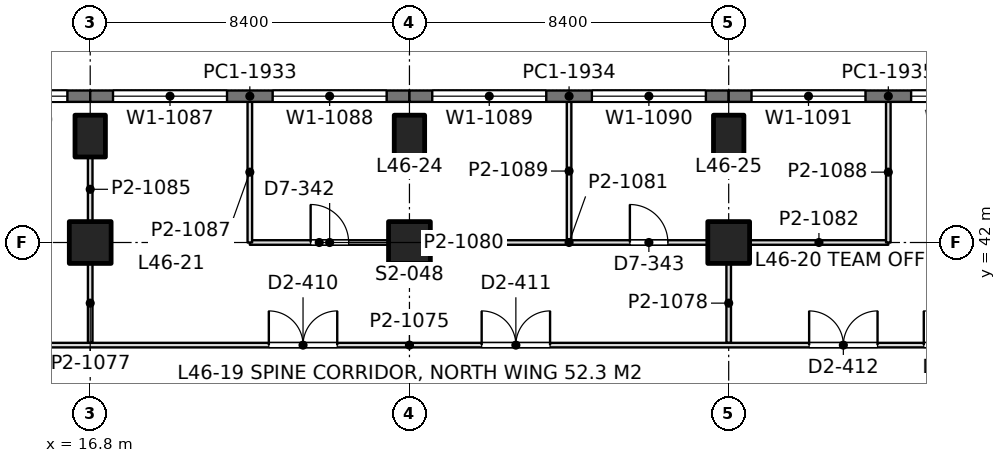
"""IFC4 building model, lengths in metres.
Left out: names, types, materials, properties, quantities, classifications, styles, units other than length and angle.
Written with IfcOpenShell. Run it as: python <this file> out.ifc"""

import sys

from ifc_helpers import new_model, si_unit, direction, frame, frame_2d, origin, origin_2d, place, context, subcontext, project, spatial, rectangle, extrude, element, fill, save


model = new_model("IFC4")
c1 = context("Model", 3, precision=1e-05, world=origin(), true_north=direction((0.0, 1.0)))
c2 = subcontext(c1, "Body", "Model", "MODEL_VIEW")
j1 = project(units=[si_unit("LENGTHUNIT", "METRE"), si_unit("PLANEANGLEUNIT", "RADIAN")], contexts=[c1])
p1 = place(None, origin())
s1 = spatial("IfcSite", under=j1, at=p1, CompositionType="ELEMENT")
p2 = place(p1, origin())
s2 = spatial("IfcBuilding", under=s1, at=p2, CompositionType="ELEMENT")
p3 = place(p2, frame((0.0, 0.0, 202.8)))
s3 = spatial("IfcBuildingStorey", under=s2, at=p3, CompositionType="ELEMENT", Elevation=202.8)
p4 = place(p3, frame((16.8, 42.0, 0.0), z_axis=(0.0, 0.0, 1.0), x_axis=(1.0, 0.0, 0.0)))
e1 = element("IfcColumn", 1, at=p4, inside=s3, PredefinedType="COLUMN", context=c2, shape_type="SweptSolid", body=[
    extrude(rectangle(XDim=1.1, YDim=1.1, at=origin_2d()), origin(), (0.0, 0.0, 1.0), 4.2),
])
p5 = place(p3, frame((16.8, 44.8, 0.0), z_axis=(0.0, 0.0, 1.0), x_axis=(1.0, 0.0, 0.0)))
e2 = element("IfcColumn", 2, at=p5, inside=s3, PredefinedType="COLUMN", context=c2, shape_type="SweptSolid", body=[
    extrude(rectangle(XDim=0.8, YDim=1.1, at=origin_2d()), origin(), (0.0, 0.0, 1.0), 4.2),
])
p6 = place(p3, frame((25.2, 42.0, 0.0), z_axis=(0.0, 0.0, 1.0), x_axis=(1.0, 0.0, 0.0)))
e3 = element("IfcColumn", 3, at=p6, inside=s3, PredefinedType="COLUMN", context=c2, shape_type="SweptSolid", body=[
    extrude(rectangle(XDim=1.1, YDim=1.1, at=origin_2d()), origin(), (0.0, 0.0, 1.0), 4.2),
])
p7 = place(p3, frame((25.2, 44.8, 0.0), z_axis=(0.0, 0.0, 1.0), x_axis=(1.0, 0.0, 0.0)))
e4 = element("IfcColumn", 4, at=p7, inside=s3, PredefinedType="COLUMN", context=c2, shape_type="SweptSolid", body=[
    extrude(rectangle(XDim=0.8, YDim=1.1, at=origin_2d()), origin(), (0.0, 0.0, 1.0), 4.2),
])
p8 = place(p3, frame((33.6, 42.0, 0.0), z_axis=(0.0, 0.0, 1.0), x_axis=(1.0, 0.0, 0.0)))
e5 = element("IfcColumn", 5, at=p8, inside=s3, PredefinedType="COLUMN", context=c2, shape_type="SweptSolid", body=[
    extrude(rectangle(XDim=1.1, YDim=1.1, at=origin_2d()), origin(), (0.0, 0.0, 1.0), 4.2),
])
p9 = place(p3, frame((33.6, 44.8, 0.0), z_axis=(0.0, 0.0, 1.0), x_axis=(1.0, 0.0, 0.0)))
e6 = element("IfcColumn", 6, at=p9, inside=s3, PredefinedType="COLUMN", context=c2, shape_type="SweptSolid", body=[
    extrude(rectangle(XDim=0.8, YDim=1.1, at=origin_2d()), origin(), (0.0, 0.0, 1.0), 4.2),
])
p10 = place(p3, frame((8.4, 45.85, 0.0), z_axis=(0.0, 0.0, 1.0), x_axis=(1.0, 0.0, 0.0)))
e7 = element("IfcWall", 7, at=p10, inside=s3, PredefinedType="SOLIDWALL", context=c2, shape_type="SweptSolid", body=[
    extrude(rectangle(XDim=8.4, YDim=0.3, at=frame_2d((4.2, 0.0))), origin(), (0.0, 0.0, 1.0), 4.05),
])
p11 = place(p10, frame((0.6, 0.0, 0.9)))
e8 = element("IfcOpeningElement", 8, at=p11, cuts=e7, PredefinedType="OPENING", context=c2, shape_type="SweptSolid", body=[
    extrude(rectangle(XDim=3.0, YDim=1.9, at=frame_2d((1.5, 0.95))), frame((0.0, 0.16, 0.0), z_axis=(0.0, -1.0, 0.0), x_axis=(1.0, 0.0, 0.0)), (0.0, 0.0, 1.0), 0.32),
])
p12 = place(p10, frame((4.8, 0.0, 0.9)))
e9 = element("IfcOpeningElement", 9, at=p12, cuts=e7, PredefinedType="OPENING", context=c2, shape_type="SweptSolid", body=[
    extrude(rectangle(XDim=3.0, YDim=1.9, at=frame_2d((1.5, 0.95))), frame((0.0, 0.16, 0.0), z_axis=(0.0, -1.0, 0.0), x_axis=(1.0, 0.0, 0.0)), (0.0, 0.0, 1.0), 0.32),
])
p13 = place(p3, frame((16.8, 45.85, 0.0), z_axis=(0.0, 0.0, 1.0), x_axis=(1.0, 0.0, 0.0)))
e10 = element("IfcWall", 10, at=p13, inside=s3, PredefinedType="SOLIDWALL", context=c2, shape_type="SweptSolid", body=[
    extrude(rectangle(XDim=8.4, YDim=0.3, at=frame_2d((4.2, 0.0))), origin(), (0.0, 0.0, 1.0), 4.05),
])
p14 = place(p13, frame((0.6, 0.0, 0.9)))
e11 = element("IfcOpeningElement", 11, at=p14, cuts=e10, PredefinedType="OPENING", context=c2, shape_type="SweptSolid", body=[
    extrude(rectangle(XDim=3.0, YDim=1.9, at=frame_2d((1.5, 0.95))), frame((0.0, 0.16, 0.0), z_axis=(0.0, -1.0, 0.0), x_axis=(1.0, 0.0, 0.0)), (0.0, 0.0, 1.0), 0.32),
])
p15 = place(p13, frame((4.8, 0.0, 0.9)))
e12 = element("IfcOpeningElement", 12, at=p15, cuts=e10, PredefinedType="OPENING", context=c2, shape_type="SweptSolid", body=[
    extrude(rectangle(XDim=3.0, YDim=1.9, at=frame_2d((1.5, 0.95))), frame((0.0, 0.16, 0.0), z_axis=(0.0, -1.0, 0.0), x_axis=(1.0, 0.0, 0.0)), (0.0, 0.0, 1.0), 0.32),
])
p16 = place(p3, frame((25.2, 45.85, 0.0), z_axis=(0.0, 0.0, 1.0), x_axis=(1.0, 0.0, 0.0)))
e13 = element("IfcWall", 13, at=p16, inside=s3, PredefinedType="SOLIDWALL", context=c2, shape_type="SweptSolid", body=[
    extrude(rectangle(XDim=8.4, YDim=0.3, at=frame_2d((4.2, 0.0))), origin(), (0.0, 0.0, 1.0), 4.05),
])
p17 = place(p16, frame((0.6, 0.0, 0.9)))
e14 = element("IfcOpeningElement", 14, at=p17, cuts=e13, PredefinedType="OPENING", context=c2, shape_type="SweptSolid", body=[
    extrude(rectangle(XDim=3.0, YDim=1.9, at=frame_2d((1.5, 0.95))), frame((0.0, 0.16, 0.0), z_axis=(0.0, -1.0, 0.0), x_axis=(1.0, 0.0, 0.0)), (0.0, 0.0, 1.0), 0.32),
])
p18 = place(p16, frame((4.8, 0.0, 0.9)))
e15 = element("IfcOpeningElement", 15, at=p18, cuts=e13, PredefinedType="OPENING", context=c2, shape_type="SweptSolid", body=[
    extrude(rectangle(XDim=3.0, YDim=1.9, at=frame_2d((1.5, 0.95))), frame((0.0, 0.16, 0.0), z_axis=(0.0, -1.0, 0.0), x_axis=(1.0, 0.0, 0.0)), (0.0, 0.0, 1.0), 0.32),
])
p19 = place(p3, frame((33.6, 45.85, 0.0), z_axis=(0.0, 0.0, 1.0), x_axis=(1.0, 0.0, 0.0)))
e16 = element("IfcWall", 16, at=p19, inside=s3, PredefinedType="SOLIDWALL", context=c2, shape_type="SweptSolid", body=[
    extrude(rectangle(XDim=8.4, YDim=0.3, at=frame_2d((4.2, 0.0))), origin(), (0.0, 0.0, 1.0), 4.05),
])
p20 = place(p19, frame((0.6, 0.0, 0.9)))
e17 = element("IfcOpeningElement", 17, at=p20, cuts=e16, PredefinedType="OPENING", context=c2, shape_type="SweptSolid", body=[
    extrude(rectangle(XDim=3.0, YDim=1.9, at=frame_2d((1.5, 0.95))), frame((0.0, 0.16, 0.0), z_axis=(0.0, -1.0, 0.0), x_axis=(1.0, 0.0, 0.0)), (0.0, 0.0, 1.0), 0.32),
])
p21 = place(p19, frame((4.8, 0.0, 0.9)))
e18 = element("IfcOpeningElement", 18, at=p21, cuts=e16, PredefinedType="OPENING", context=c2, shape_type="SweptSolid", body=[
    extrude(rectangle(XDim=3.0, YDim=1.9, at=frame_2d((1.5, 0.95))), frame((0.0, 0.16, 0.0), z_axis=(0.0, -1.0, 0.0), x_axis=(1.0, 0.0, 0.0)), (0.0, 0.0, 1.0), 0.32),
])
p22 = place(p3, frame((21.0, 42.0, 0.0), z_axis=(0.0, 0.0, 1.0), x_axis=(1.0, 0.0, 0.0)))
e19 = element("IfcWall", 19, at=p22, inside=s3, PredefinedType="PARTITIONING", context=c2, shape_type="SweptSolid", body=[
    extrude(rectangle(XDim=3.651, YDim=0.12, at=frame_2d((1.825, 0.0))), origin(), (0.0, 0.0, 1.0), 3.55),
])
p23 = place(p22, frame((1.6, 0.0, 0.0)))
e20 = element("IfcOpeningElement", 20, at=p23, cuts=e19, PredefinedType="OPENING", context=c2, shape_type="SweptSolid", body=[
    extrude(rectangle(XDim=1.0, YDim=2.4, at=frame_2d((0.5, 1.2))), frame((0.0, 0.07, 0.0), z_axis=(0.0, -1.0, 0.0), x_axis=(1.0, 0.0, 0.0)), (0.0, 0.0, 1.0), 0.14),
])
p24 = place(p3, frame((25.749, 42.0, 0.0), z_axis=(0.0, 0.0, 1.0), x_axis=(1.0, 0.0, 0.0)))
e21 = element("IfcWall", 21, at=p24, inside=s3, PredefinedType="PARTITIONING", context=c2, shape_type="SweptSolid", body=[
    extrude(rectangle(XDim=7.302, YDim=0.12, at=frame_2d((3.651, 0.0))), origin(), (0.0, 0.0, 1.0), 3.55),
])
p25 = place(p24, frame((5.251, 0.0, 0.0)))
e22 = element("IfcOpeningElement", 22, at=p25, cuts=e21, PredefinedType="OPENING", context=c2, shape_type="SweptSolid", body=[
    extrude(rectangle(XDim=1.0, YDim=2.4, at=frame_2d((0.5, 1.2))), frame((0.0, 0.07, 0.0), z_axis=(0.0, -1.0, 0.0), x_axis=(1.0, 0.0, 0.0)), (0.0, 0.0, 1.0), 0.14),
])
p26 = place(p3, frame((34.149, 42.0, 0.0), z_axis=(0.0, 0.0, 1.0), x_axis=(1.0, 0.0, 0.0)))
e23 = element("IfcWall", 23, at=p26, inside=s3, PredefinedType="PARTITIONING", context=c2, shape_type="SweptSolid", body=[
    extrude(rectangle(XDim=3.651, YDim=0.12, at=frame_2d((1.826, 0.0))), origin(), (0.0, 0.0, 1.0), 3.55),
])
p27 = place(p3, frame((21.0, 42.0, 0.0), z_axis=(0.0, 0.0, 1.0), x_axis=(0.0, 1.0, 0.0)))
e24 = element("IfcWall", 24, at=p27, inside=s3, PredefinedType="PARTITIONING", context=c2, shape_type="SweptSolid", body=[
    extrude(rectangle(XDim=3.702, YDim=0.12, at=frame_2d((1.851, 0.0))), origin(), (0.0, 0.0, 1.0), 3.55),
])
p28 = place(p3, frame((29.4, 42.058, 0.0), z_axis=(0.0, 0.0, 1.0), x_axis=(0.0, 1.0, 0.0)))
e25 = element("IfcWall", 25, at=p28, inside=s3, PredefinedType="PARTITIONING", context=c2, shape_type="SweptSolid", body=[
    extrude(rectangle(XDim=3.644, YDim=0.12, at=frame_2d((1.822, 0.0))), origin(), (0.0, 0.0, 1.0), 3.55),
])
p29 = place(p3, frame((37.8, 42.0, 0.0), z_axis=(0.0, 0.0, 1.0), x_axis=(0.0, 1.0, 0.0)))
e26 = element("IfcWall", 26, at=p29, inside=s3, PredefinedType="PARTITIONING", context=c2, shape_type="SweptSolid", body=[
    extrude(rectangle(XDim=3.702, YDim=0.12, at=frame_2d((1.851, 0.0))), origin(), (0.0, 0.0, 1.0), 3.55),
])
p30 = place(p3, frame((16.8, 39.358, 0.0), z_axis=(0.0, 0.0, 1.0), x_axis=(0.0, 1.0, 0.0)))
e27 = element("IfcWall", 27, at=p30, inside=s3, PredefinedType="PARTITIONING", context=c2, shape_type="SweptSolid", body=[
    extrude(rectangle(XDim=2.093, YDim=0.12, at=frame_2d((1.046, 0.0))), origin(), (0.0, 0.0, 1.0), 3.69),
])
p31 = place(p3, frame((16.8, 42.549, 0.0), z_axis=(0.0, 0.0, 1.0), x_axis=(0.0, 1.0, 0.0)))
e28 = element("IfcWall", 28, at=p31, inside=s3, PredefinedType="PARTITIONING", context=c2, shape_type="SweptSolid", body=[
    extrude(rectangle(XDim=1.702, YDim=0.12, at=frame_2d((0.851, 0.0))), origin(), (0.0, 0.0, 1.0), 3.69),
])
p32 = place(p3, frame((33.6, 39.358, 0.0), z_axis=(0.0, 0.0, 1.0), x_axis=(0.0, 1.0, 0.0)))
e29 = element("IfcWall", 29, at=p32, inside=s3, PredefinedType="PARTITIONING", context=c2, shape_type="SweptSolid", body=[
    extrude(rectangle(XDim=2.093, YDim=0.12, at=frame_2d((1.046, 0.0))), origin(), (0.0, 0.0, 1.0), 3.69),
])
p33 = place(p3, frame((7.748, 39.3, 0.0), z_axis=(0.0, 0.0, 1.0), x_axis=(1.0, 0.0, 0.0)))
e30 = element("IfcWall", 30, at=p33, inside=s3, PredefinedType="PARTITIONING", context=c2, shape_type="SweptSolid", body=[
    extrude(rectangle(XDim=34.904, YDim=0.12, at=frame_2d((17.452, 0.0))), origin(), (0.0, 0.0, 1.0), 3.55),
])
p34 = place(p33, frame((2.119, 0.0, 0.0)))
e31 = element("IfcOpeningElement", 31, at=p34, cuts=e30, PredefinedType="OPENING", context=c2, shape_type="SweptSolid", body=[
    extrude(rectangle(XDim=1.8, YDim=2.2, at=frame_2d((0.9, 1.1))), frame((0.0, 0.07, 0.0), z_axis=(0.0, -1.0, 0.0), x_axis=(1.0, 0.0, 0.0)), (0.0, 0.0, 1.0), 0.14),
])
p35 = place(p33, frame((5.135, 0.0, 0.0)))
e32 = element("IfcOpeningElement", 32, at=p35, cuts=e30, PredefinedType="OPENING", context=c2, shape_type="SweptSolid", body=[
    extrude(rectangle(XDim=1.8, YDim=2.2, at=frame_2d((0.9, 1.1))), frame((0.0, 0.07, 0.0), z_axis=(0.0, -1.0, 0.0), x_axis=(1.0, 0.0, 0.0)), (0.0, 0.0, 1.0), 0.14),
])
p36 = place(p33, frame((13.752, 0.0, 0.0)))
e33 = element("IfcOpeningElement", 33, at=p36, cuts=e30, PredefinedType="OPENING", context=c2, shape_type="SweptSolid", body=[
    extrude(rectangle(XDim=1.8, YDim=2.2, at=frame_2d((0.9, 1.1))), frame((0.0, 0.07, 0.0), z_axis=(0.0, -1.0, 0.0), x_axis=(1.0, 0.0, 0.0)), (0.0, 0.0, 1.0), 0.14),
])
p37 = place(p33, frame((19.352, 0.0, 0.0)))
e34 = element("IfcOpeningElement", 34, at=p37, cuts=e30, PredefinedType="OPENING", context=c2, shape_type="SweptSolid", body=[
    extrude(rectangle(XDim=1.8, YDim=2.2, at=frame_2d((0.9, 1.1))), frame((0.0, 0.07, 0.0), z_axis=(0.0, -1.0, 0.0), x_axis=(1.0, 0.0, 0.0)), (0.0, 0.0, 1.0), 0.14),
])
p38 = place(p33, frame((27.969, 0.0, 0.0)))
e35 = element("IfcOpeningElement", 35, at=p38, cuts=e30, PredefinedType="OPENING", context=c2, shape_type="SweptSolid", body=[
    extrude(rectangle(XDim=1.8, YDim=2.2, at=frame_2d((0.9, 1.1))), frame((0.0, 0.07, 0.0), z_axis=(0.0, -1.0, 0.0), x_axis=(1.0, 0.0, 0.0)), (0.0, 0.0, 1.0), 0.14),
])
p39 = place(p33, frame((30.985, 0.0, 0.0)))
e36 = element("IfcOpeningElement", 36, at=p39, cuts=e30, PredefinedType="OPENING", context=c2, shape_type="SweptSolid", body=[
    extrude(rectangle(XDim=1.8, YDim=2.2, at=frame_2d((0.9, 1.1))), frame((0.0, 0.07, 0.0), z_axis=(0.0, -1.0, 0.0), x_axis=(1.0, 0.0, 0.0)), (0.0, 0.0, 1.0), 0.14),
])
p40 = place(p12, origin())
e37 = element("IfcWindow", 37, at=p40, inside=s3, PartitioningType="SINGLE_PANEL", PredefinedType="WINDOW", context=c2, shape_type="SweptSolid", body=[
    extrude(rectangle(XDim=3.0, YDim=1.9, at=frame_2d((1.5, 0.95))), frame((0.0, 0.03, 0.0), z_axis=(0.0, -1.0, 0.0), x_axis=(1.0, 0.0, 0.0)), (0.0, 0.0, 1.0), 0.06),
])
fill(e9, e37)
p41 = place(p14, origin())
e38 = element("IfcWindow", 38, at=p41, inside=s3, PartitioningType="SINGLE_PANEL", PredefinedType="WINDOW", context=c2, shape_type="SweptSolid", body=[
    extrude(rectangle(XDim=3.0, YDim=1.9, at=frame_2d((1.5, 0.95))), frame((0.0, 0.03, 0.0), z_axis=(0.0, -1.0, 0.0), x_axis=(1.0, 0.0, 0.0)), (0.0, 0.0, 1.0), 0.06),
])
fill(e11, e38)
p42 = place(p15, origin())
e39 = element("IfcWindow", 39, at=p42, inside=s3, PartitioningType="SINGLE_PANEL", PredefinedType="WINDOW", context=c2, shape_type="SweptSolid", body=[
    extrude(rectangle(XDim=3.0, YDim=1.9, at=frame_2d((1.5, 0.95))), frame((0.0, 0.03, 0.0), z_axis=(0.0, -1.0, 0.0), x_axis=(1.0, 0.0, 0.0)), (0.0, 0.0, 1.0), 0.06),
])
fill(e12, e39)
p43 = place(p17, origin())
e40 = element("IfcWindow", 40, at=p43, inside=s3, PartitioningType="SINGLE_PANEL", PredefinedType="WINDOW", context=c2, shape_type="SweptSolid", body=[
    extrude(rectangle(XDim=3.0, YDim=1.9, at=frame_2d((1.5, 0.95))), frame((0.0, 0.03, 0.0), z_axis=(0.0, -1.0, 0.0), x_axis=(1.0, 0.0, 0.0)), (0.0, 0.0, 1.0), 0.06),
])
fill(e14, e40)
p44 = place(p18, origin())
e41 = element("IfcWindow", 41, at=p44, inside=s3, PartitioningType="SINGLE_PANEL", PredefinedType="WINDOW", context=c2, shape_type="SweptSolid", body=[
    extrude(rectangle(XDim=3.0, YDim=1.9, at=frame_2d((1.5, 0.95))), frame((0.0, 0.03, 0.0), z_axis=(0.0, -1.0, 0.0), x_axis=(1.0, 0.0, 0.0)), (0.0, 0.0, 1.0), 0.06),
])
fill(e15, e41)
p45 = place(p20, origin())
e42 = element("IfcWindow", 42, at=p45, inside=s3, PartitioningType="SINGLE_PANEL", PredefinedType="WINDOW", context=c2, shape_type="SweptSolid", body=[
    extrude(rectangle(XDim=3.0, YDim=1.9, at=frame_2d((1.5, 0.95))), frame((0.0, 0.03, 0.0), z_axis=(0.0, -1.0, 0.0), x_axis=(1.0, 0.0, 0.0)), (0.0, 0.0, 1.0), 0.06),
])
fill(e17, e42)
p46 = place(p21, origin())
e43 = element("IfcWindow", 43, at=p46, inside=s3, PartitioningType="SINGLE_PANEL", PredefinedType="WINDOW", context=c2, shape_type="SweptSolid", body=[
    extrude(rectangle(XDim=3.0, YDim=1.9, at=frame_2d((1.5, 0.95))), frame((0.0, 0.03, 0.0), z_axis=(0.0, -1.0, 0.0), x_axis=(1.0, 0.0, 0.0)), (0.0, 0.0, 1.0), 0.06),
])
fill(e18, e43)
p47 = place(p23, origin())
e44 = element("IfcDoor", 44, at=p47, inside=s3, OperationType="SINGLE_SWING_LEFT", PredefinedType="DOOR", context=c2, shape_type="SweptSolid", body=[
    extrude(rectangle(XDim=1.0, YDim=2.4, at=frame_2d((0.5, 1.2))), frame((0.0, 0.025, 0.0), z_axis=(0.0, -1.0, 0.0), x_axis=(1.0, 0.0, 0.0)), (0.0, 0.0, 1.0), 0.05),
])
fill(e20, e44)
p48 = place(p25, origin())
e45 = element("IfcDoor", 45, at=p48, inside=s3, OperationType="SINGLE_SWING_LEFT", PredefinedType="DOOR", context=c2, shape_type="SweptSolid", body=[
    extrude(rectangle(XDim=1.0, YDim=2.4, at=frame_2d((0.5, 1.2))), frame((0.0, 0.025, 0.0), z_axis=(0.0, -1.0, 0.0), x_axis=(1.0, 0.0, 0.0)), (0.0, 0.0, 1.0), 0.05),
])
fill(e22, e45)
p49 = place(p36, origin())
e46 = element("IfcDoor", 46, at=p49, inside=s3, OperationType="DOUBLE_DOOR_SINGLE_SWING", PredefinedType="DOOR", context=c2, shape_type="SweptSolid", body=[
    extrude(rectangle(XDim=1.8, YDim=2.2, at=frame_2d((0.9, 1.1))), frame((0.0, 0.025, 0.0), z_axis=(0.0, -1.0, 0.0), x_axis=(1.0, 0.0, 0.0)), (0.0, 0.0, 1.0), 0.05),
])
fill(e33, e46)
p50 = place(p37, origin())
e47 = element("IfcDoor", 47, at=p50, inside=s3, OperationType="DOUBLE_DOOR_SINGLE_SWING", PredefinedType="DOOR", context=c2, shape_type="SweptSolid", body=[
    extrude(rectangle(XDim=1.8, YDim=2.2, at=frame_2d((0.9, 1.1))), frame((0.0, 0.025, 0.0), z_axis=(0.0, -1.0, 0.0), x_axis=(1.0, 0.0, 0.0)), (0.0, 0.0, 1.0), 0.05),
])
fill(e34, e47)
p51 = place(p38, origin())
e48 = element("IfcDoor", 48, at=p51, inside=s3, OperationType="DOUBLE_DOOR_SINGLE_SWING", PredefinedType="DOOR", context=c2, shape_type="SweptSolid", body=[
    extrude(rectangle(XDim=1.8, YDim=2.2, at=frame_2d((0.9, 1.1))), frame((0.0, 0.025, 0.0), z_axis=(0.0, -1.0, 0.0), x_axis=(1.0, 0.0, 0.0)), (0.0, 0.0, 1.0), 0.05),
])
fill(e35, e48)
p52 = place(p39, origin())
e49 = element("IfcDoor", 49, at=p52, inside=s3, OperationType="DOUBLE_DOOR_SINGLE_SWING", PredefinedType="DOOR", context=c2, shape_type="SweptSolid", body=[
    extrude(rectangle(XDim=1.8, YDim=2.2, at=frame_2d((0.9, 1.1))), frame((0.0, 0.025, 0.0), z_axis=(0.0, -1.0, 0.0), x_axis=(1.0, 0.0, 0.0)), (0.0, 0.0, 1.0), 0.05),
])
fill(e36, e49)
save(model, sys.argv[1])
